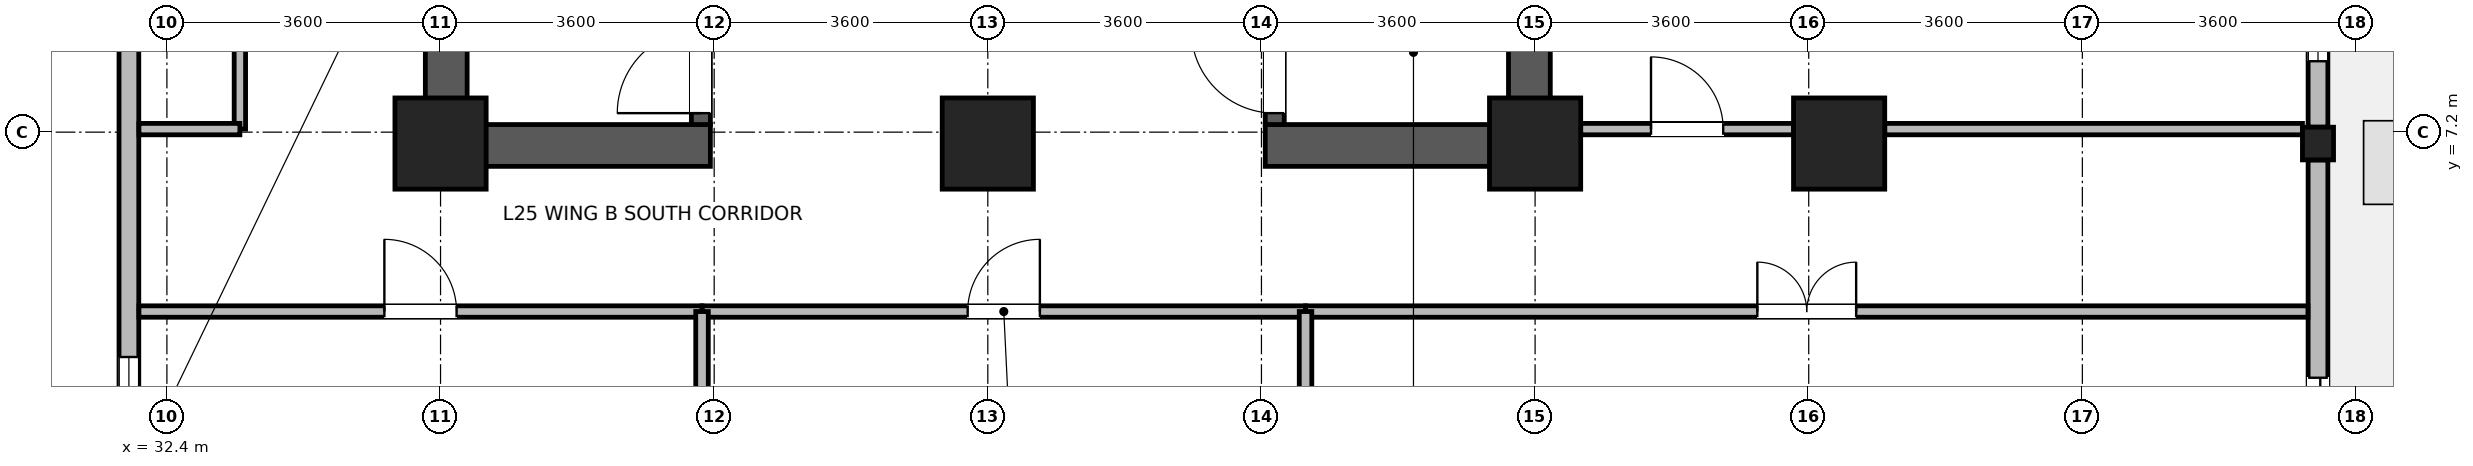
"""IFC4 building model, lengths in metres.
Left out: names, types, materials, properties, quantities, classifications, styles, units other than length and angle.
Written with IfcOpenShell. Run it as: python <this file> out.ifc"""

import sys

from ifc_helpers import new_model, si_unit, direction, frame, frame_2d, origin, origin_2d, place, context, subcontext, project, spatial, rectangle, i_section, extrude, source, transform, mapped, element, fill, save


model = new_model("IFC4")
c1 = context("Model", 3, precision=1e-05, world=origin(), true_north=direction((0.0, 1.0)))
c2 = subcontext(c1, "Body", "Model", "MODEL_VIEW")
j1 = project(units=[si_unit("LENGTHUNIT", "METRE"), si_unit("PLANEANGLEUNIT", "RADIAN")], contexts=[c1])
p1 = place(None, origin())
s1 = spatial("IfcSite", under=j1, at=p1, CompositionType="ELEMENT")
p2 = place(p1, origin())
s2 = spatial("IfcBuilding", under=s1, at=p2, CompositionType="ELEMENT")
p3 = place(p2, frame((0.0, 0.0, 100.8)))
s3 = spatial("IfcBuildingStorey", under=s2, at=p3, CompositionType="ELEMENT", Elevation=100.8)
for number, where, z_axis, x_axis in (
    (1, (36.075, 6.75, 0.0), (0.0, 0.0, 1.0), (0.0, 1.0, 0.0)),
    (2, (50.325, 6.75, 0.0), (0.0, 0.0, 1.0), (0.0, 1.0, 0.0)),
):
    element("IfcWall", number, at=place(p3, frame(where, z_axis=z_axis, x_axis=x_axis)), inside=s3, PredefinedType="SHEAR", context=c2, shape_type="SweptSolid", body=[
        extrude(rectangle(XDim=8.1, YDim=0.55, at=frame_2d((4.05, 0.0))), origin(), (0.0, 0.0, 1.0), 3.45),
    ])
for number, where, z_axis, x_axis in (
    (3, (36.35, 7.025, 0.0), (0.0, 0.0, 1.0), (1.0, 0.0, 0.0)),
    (4, (46.85, 7.025, 0.0), (0.0, 0.0, 1.0), (1.0, 0.0, 0.0)),
):
    element("IfcWall", number, at=place(p3, frame(where, z_axis=z_axis, x_axis=x_axis)), inside=s3, PredefinedType="SHEAR", context=c2, shape_type="SweptSolid", body=[
        extrude(rectangle(XDim=3.2, YDim=0.55, at=frame_2d((1.6, 0.0))), origin(), (0.0, 0.0, 1.0), 3.45),
    ])
p4 = place(p3, frame((39.425, 7.3, 0.0), z_axis=(0.0, 0.0, 1.0), x_axis=(0.0, 1.0, 0.0)))
e5 = element("IfcWall", 5, at=p4, inside=s3, PredefinedType="SHEAR", context=c2, shape_type="SweptSolid", body=[
    extrude(rectangle(XDim=7.0, YDim=0.25, at=frame_2d((3.5, 0.0))), origin(), (0.0, 0.0, 1.0), 3.45),
])
p5 = place(p4, frame((0.15, 0.0, 0.0)))
e6 = element("IfcOpeningElement", 6, at=p5, cuts=e5, PredefinedType="OPENING", context=c2, shape_type="SweptSolid", body=[
    extrude(rectangle(XDim=1.1, YDim=2.08, at=frame_2d((0.55, 1.04))), frame((0.0, 0.135, 0.0), z_axis=(0.0, -1.0, 0.0), x_axis=(1.0, 0.0, 0.0)), (0.0, 0.0, 1.0), 0.27),
])
p6 = place(p3, frame((46.975, 7.3, 0.0), z_axis=(0.0, 0.0, 1.0), x_axis=(0.0, 1.0, 0.0)))
e7 = element("IfcWall", 7, at=p6, inside=s3, PredefinedType="SHEAR", context=c2, shape_type="SweptSolid", body=[
    extrude(rectangle(XDim=7.0, YDim=0.25, at=frame_2d((3.5, 0.0))), origin(), (0.0, 0.0, 1.0), 3.45),
])
p7 = place(p6, frame((0.15, 0.0, 0.0)))
e8 = element("IfcOpeningElement", 8, at=p7, cuts=e7, PredefinedType="OPENING", context=c2, shape_type="SweptSolid", body=[
    extrude(rectangle(XDim=1.1, YDim=2.08, at=frame_2d((0.55, 1.04))), frame((0.0, 0.135, 0.0), z_axis=(0.0, -1.0, 0.0), x_axis=(1.0, 0.0, 0.0)), (0.0, 0.0, 1.0), 0.27),
])
m1 = source(origin(), c2, "Body", "SweptSolid", [
    extrude(rectangle(XDim=1.2, YDim=1.2, at=origin_2d()), origin(), (0.0, 0.0, 1.0), 3.7),
])
for number, where, z_axis, x_axis in (
    (9, (36.0, 7.05, 0.0), (0.0, 0.0, 1.0), (1.0, 0.0, 0.0)),
    (10, (43.2, 7.05, 0.0), (0.0, 0.0, 1.0), (1.0, 0.0, 0.0)),
    (11, (50.4, 7.05, 0.0), (0.0, 0.0, 1.0), (1.0, 0.0, 0.0)),
    (12, (54.4, 7.05, 0.0), (0.0, 0.0, 1.0), (1.0, 0.0, 0.0)),
):
    element("IfcColumn", number, at=place(p3, frame(where, z_axis=z_axis, x_axis=x_axis)), inside=s3, PredefinedType="COLUMN", context=c2, shape_type="MappedRepresentation", body=[
        mapped(m1, transform((0.0, 0.0, 0.0), x_axis=(1.0, 0.0, 0.0), y_axis=(0.0, 1.0, 0.0), z_axis=(0.0, 0.0, 1.0), scale=1.0)),
    ])
m2 = source(origin(), c2, "Body", "SweptSolid", [
    extrude(i_section(OverallWidth=0.409, OverallDepth=0.43, WebThickness=0.024, FlangeThickness=0.033, FilletRadius=0.015, at=origin_2d()), origin(), (0.0, 0.0, 1.0), 3.7),
])
p8 = place(p3, frame((60.7, 7.05, 0.0), z_axis=(0.0, 0.0, 1.0), x_axis=(1.0, 0.0, 0.0)))
e13 = element("IfcColumn", 13, at=p8, inside=s3, PredefinedType="COLUMN", context=c2, shape_type="MappedRepresentation", body=[
    mapped(m2, transform((0.0, 0.0, 0.0), x_axis=(1.0, 0.0, 0.0), y_axis=(0.0, 1.0, 0.0), z_axis=(0.0, 0.0, 1.0), scale=1.0)),
])
p9 = place(p3, frame((60.7, 6.834, 0.0), z_axis=(0.0, 0.0, 1.0), x_axis=(0.0, -1.0, 0.0)))
e14 = element("IfcWall", 14, at=p9, inside=s3, PredefinedType="STANDARD", context=c2, shape_type="SweptSolid", body=[
    extrude(rectangle(XDim=5.164, YDim=0.26, at=frame_2d((2.582, 0.0))), origin(), (0.0, 0.0, 1.0), 3.43),
])
p10 = place(p9, frame((2.865, 0.0, 0.0)))
e15 = element("IfcOpeningElement", 15, at=p10, cuts=e14, PredefinedType="OPENING", context=c2, shape_type="SweptSolid", body=[
    extrude(rectangle(XDim=1.5, YDim=2.15, at=frame_2d((0.75, 1.075))), frame((0.0, 0.14, 0.0), z_axis=(0.0, -1.0, 0.0), x_axis=(1.0, 0.0, 0.0)), (0.0, 0.0, 1.0), 0.28),
])
p11 = place(p3, frame((60.7, 14.334, 0.0), z_axis=(0.0, 0.0, 1.0), x_axis=(0.0, -1.0, 0.0)))
e16 = element("IfcWall", 16, at=p11, inside=s3, PredefinedType="STANDARD", context=c2, shape_type="SweptSolid", body=[
    extrude(rectangle(XDim=7.068, YDim=0.26, at=frame_2d((3.534, 0.0))), origin(), (0.0, 0.0, 1.0), 2.98),
])
p12 = place(p11, frame((0.867, 0.0, 0.85)))
e17 = element("IfcOpeningElement", 17, at=p12, cuts=e16, PredefinedType="OPENING", context=c2, shape_type="SweptSolid", body=[
    extrude(rectangle(XDim=1.8, YDim=1.85, at=frame_2d((0.9, 0.925))), frame((0.0, 0.14, 0.0), z_axis=(0.0, -1.0, 0.0), x_axis=(1.0, 0.0, 0.0)), (0.0, 0.0, 1.0), 0.28),
])
p13 = place(p11, frame((4.401, 0.0, 0.85)))
e18 = element("IfcOpeningElement", 18, at=p13, cuts=e16, PredefinedType="OPENING", context=c2, shape_type="SweptSolid", body=[
    extrude(rectangle(XDim=1.8, YDim=1.85, at=frame_2d((0.9, 0.925))), frame((0.0, 0.14, 0.0), z_axis=(0.0, -1.0, 0.0), x_axis=(1.0, 0.0, 0.0)), (0.0, 0.0, 1.0), 0.28),
])
p14 = place(p3, frame((31.9, 1.67, 0.0), z_axis=(0.0, 0.0, 1.0), x_axis=(0.0, 1.0, 0.0)))
e19 = element("IfcWall", 19, at=p14, inside=s3, PredefinedType="STANDARD", context=c2, shape_type="SweptSolid", body=[
    extrude(rectangle(XDim=20.06, YDim=0.26, at=frame_2d((10.03, 0.0))), origin(), (0.0, 0.0, 1.0), 3.43),
])
p15 = place(p14, frame((0.772, 0.0, 0.85)))
e20 = element("IfcOpeningElement", 20, at=p15, cuts=e19, PredefinedType="OPENING", context=c2, shape_type="SweptSolid", body=[
    extrude(rectangle(XDim=1.8, YDim=1.85, at=frame_2d((0.9, 0.925))), frame((0.0, 0.14, 0.0), z_axis=(0.0, -1.0, 0.0), x_axis=(1.0, 0.0, 0.0)), (0.0, 0.0, 1.0), 0.28),
])
p16 = place(p14, frame((7.458, 0.0, 0.85)))
e21 = element("IfcOpeningElement", 21, at=p16, cuts=e19, PredefinedType="OPENING", context=c2, shape_type="SweptSolid", body=[
    extrude(rectangle(XDim=1.8, YDim=1.85, at=frame_2d((0.9, 0.925))), frame((0.0, 0.14, 0.0), z_axis=(0.0, -1.0, 0.0), x_axis=(1.0, 0.0, 0.0)), (0.0, 0.0, 1.0), 0.28),
])
p17 = place(p14, frame((14.145, 0.0, 0.85)))
e22 = element("IfcOpeningElement", 22, at=p17, cuts=e19, PredefinedType="OPENING", context=c2, shape_type="SweptSolid", body=[
    extrude(rectangle(XDim=1.8, YDim=1.85, at=frame_2d((0.9, 0.925))), frame((0.0, 0.14, 0.0), z_axis=(0.0, -1.0, 0.0), x_axis=(1.0, 0.0, 0.0)), (0.0, 0.0, 1.0), 0.28),
])
p18 = place(p14, frame((17.488, 0.0, 0.85)))
e23 = element("IfcOpeningElement", 23, at=p18, cuts=e19, PredefinedType="OPENING", context=c2, shape_type="SweptSolid", body=[
    extrude(rectangle(XDim=1.8, YDim=1.85, at=frame_2d((0.9, 0.925))), frame((0.0, 0.14, 0.0), z_axis=(0.0, -1.0, 0.0), x_axis=(1.0, 0.0, 0.0)), (0.0, 0.0, 1.0), 0.28),
])
p19 = place(p3, frame((47.38, 4.84, 0.0), z_axis=(0.0, 0.0, 1.0), x_axis=(1.0, 0.0, 0.0)))
e24 = element("IfcWall", 24, at=p19, inside=s3, PredefinedType="PARTITIONING", context=c2, shape_type="SweptSolid", body=[
    extrude(rectangle(XDim=13.188, YDim=0.15, at=frame_2d((6.594, 0.0))), origin(), (0.0, 0.0, 1.0), 3.43),
])
p20 = place(p19, frame((5.944, 0.0, 0.0)))
e25 = element("IfcOpeningElement", 25, at=p20, cuts=e24, PredefinedType="OPENING", context=c2, shape_type="SweptSolid", body=[
    extrude(rectangle(XDim=1.3, YDim=2.12, at=frame_2d((0.65, 1.06))), frame((0.0, 0.085, 0.0), z_axis=(0.0, -1.0, 0.0), x_axis=(1.0, 0.0, 0.0)), (0.0, 0.0, 1.0), 0.17),
])
p21 = place(p3, frame((51.0, 7.24, 0.0), z_axis=(0.0, 0.0, 1.0), x_axis=(1.0, 0.0, 0.0)))
e26 = element("IfcWall", 26, at=p21, inside=s3, PredefinedType="PARTITIONING", context=c2, shape_type="SweptSolid", body=[
    extrude(rectangle(XDim=2.8, YDim=0.15, at=frame_2d((1.4, 0.0))), origin(), (0.0, 0.0, 1.0), 2.78),
])
p22 = place(p21, frame((0.925, 0.0, 0.0)))
e27 = element("IfcOpeningElement", 27, at=p22, cuts=e26, PredefinedType="OPENING", context=c2, shape_type="SweptSolid", body=[
    extrude(rectangle(XDim=0.95, YDim=2.1, at=frame_2d((0.475, 1.05))), frame((0.0, 0.085, 0.0), z_axis=(0.0, -1.0, 0.0), x_axis=(1.0, 0.0, 0.0)), (0.0, 0.0, 1.0), 0.17),
])
p23 = place(p3, frame((55.0, 7.24, 0.0), z_axis=(0.0, 0.0, 1.0), x_axis=(1.0, 0.0, 0.0)))
e28 = element("IfcWall", 28, at=p23, inside=s3, PredefinedType="PARTITIONING", context=c2, shape_type="SweptSolid", body=[
    extrude(rectangle(XDim=5.496, YDim=0.15, at=frame_2d((2.748, 0.0))), origin(), (0.0, 0.0, 1.0), 2.78),
])
p24 = place(p3, frame((39.44, 4.84, 0.0), z_axis=(0.0, 0.0, 1.0), x_axis=(1.0, 0.0, 0.0)))
e29 = element("IfcWall", 29, at=p24, inside=s3, PredefinedType="PARTITIONING", context=c2, shape_type="SweptSolid", body=[
    extrude(rectangle(XDim=7.94, YDim=0.15, at=frame_2d((3.97, 0.0))), origin(), (0.0, 0.0, 1.0), 3.43),
])
p25 = place(p24, frame((3.495, 0.0, 0.0)))
e30 = element("IfcOpeningElement", 30, at=p25, cuts=e29, PredefinedType="OPENING", context=c2, shape_type="SweptSolid", body=[
    extrude(rectangle(XDim=0.95, YDim=2.1, at=frame_2d((0.475, 1.05))), frame((0.0, 0.085, 0.0), z_axis=(0.0, -1.0, 0.0), x_axis=(1.0, 0.0, 0.0)), (0.0, 0.0, 1.0), 0.17),
])
p26 = place(p3, frame((32.032, 4.84, 0.0), z_axis=(0.0, 0.0, 1.0), x_axis=(1.0, 0.0, 0.0)))
e31 = element("IfcWall", 31, at=p26, inside=s3, PredefinedType="PARTITIONING", context=c2, shape_type="SweptSolid", body=[
    extrude(rectangle(XDim=7.408, YDim=0.15, at=frame_2d((3.704, 0.0))), origin(), (0.0, 0.0, 1.0), 3.43),
])
p27 = place(p26, frame((3.229, 0.0, 0.0)))
e32 = element("IfcOpeningElement", 32, at=p27, cuts=e31, PredefinedType="OPENING", context=c2, shape_type="SweptSolid", body=[
    extrude(rectangle(XDim=0.95, YDim=2.1, at=frame_2d((0.475, 1.05))), frame((0.0, 0.085, 0.0), z_axis=(0.0, -1.0, 0.0), x_axis=(1.0, 0.0, 0.0)), (0.0, 0.0, 1.0), 0.17),
])
p28 = place(p3, frame((33.36, 7.24, 0.0), z_axis=(0.0, 0.0, 1.0), x_axis=(0.0, 1.0, 0.0)))
e33 = element("IfcWall", 33, at=p28, inside=s3, PredefinedType="PARTITIONING", context=c2, shape_type="SweptSolid", body=[
    extrude(rectangle(XDim=7.26, YDim=0.15, at=frame_2d((3.63, 0.0))), origin(), (0.0, 0.0, 1.0), 3.43),
])
p29 = place(p28, frame((2.98, 0.0, 0.0)))
e34 = element("IfcOpeningElement", 34, at=p29, cuts=e33, PredefinedType="OPENING", context=c2, shape_type="SweptSolid", body=[
    extrude(rectangle(XDim=1.3, YDim=2.12, at=frame_2d((0.65, 1.06))), frame((0.0, 0.085, 0.0), z_axis=(0.0, -1.0, 0.0), x_axis=(1.0, 0.0, 0.0)), (0.0, 0.0, 1.0), 0.17),
])
p30 = place(p3, frame((32.032, 7.24, 0.0), z_axis=(0.0, 0.0, 1.0), x_axis=(1.0, 0.0, 0.0)))
e35 = element("IfcWall", 35, at=p30, inside=s3, PredefinedType="PARTITIONING", context=c2, shape_type="SweptSolid", body=[
    extrude(rectangle(XDim=1.328, YDim=0.15, at=frame_2d((0.664, 0.0))), origin(), (0.0, 0.0, 1.0), 3.43),
])
for number, where, z_axis, x_axis in (
    (36, (39.44, 1.932, 0.0), (0.0, 0.0, 1.0), (0.0, 1.0, 0.0)),
    (37, (47.38, 1.932, 0.0), (0.0, 0.0, 1.0), (0.0, 1.0, 0.0)),
):
    element("IfcWall", number, at=place(p3, frame(where, z_axis=z_axis, x_axis=x_axis)), inside=s3, PredefinedType="PARTITIONING", context=c2, shape_type="SweptSolid", body=[
        extrude(rectangle(XDim=2.908, YDim=0.165, at=frame_2d((1.454, 0.0))), origin(), (0.0, 0.0, 1.0), 3.43),
    ])
p31 = place(p10, origin())
e38 = element("IfcDoor", 38, at=p31, inside=s3, OperationType="SLIDING_TO_LEFT", PredefinedType="DOOR", context=c2, shape_type="SweptSolid", body=[
    extrude(rectangle(XDim=1.5, YDim=2.15, at=frame_2d((0.75, 1.075))), frame((0.0, 0.025, 0.0), z_axis=(0.0, -1.0, 0.0), x_axis=(1.0, 0.0, 0.0)), (0.0, 0.0, 1.0), 0.05),
])
fill(e15, e38)
p32 = place(p13, origin())
e39 = element("IfcWindow", 39, at=p32, inside=s3, PartitioningType="SINGLE_PANEL", PredefinedType="WINDOW", context=c2, shape_type="SweptSolid", body=[
    extrude(rectangle(XDim=1.8, YDim=1.85, at=frame_2d((0.9, 0.925))), frame((0.0, 0.03, 0.0), z_axis=(0.0, -1.0, 0.0), x_axis=(1.0, 0.0, 0.0)), (0.0, 0.0, 1.0), 0.06),
])
fill(e18, e39)
p33 = place(p15, origin())
e40 = element("IfcWindow", 40, at=p33, inside=s3, PartitioningType="SINGLE_PANEL", PredefinedType="WINDOW", context=c2, shape_type="SweptSolid", body=[
    extrude(rectangle(XDim=1.8, YDim=1.85, at=frame_2d((0.9, 0.925))), frame((0.0, 0.03, 0.0), z_axis=(0.0, -1.0, 0.0), x_axis=(1.0, 0.0, 0.0)), (0.0, 0.0, 1.0), 0.06),
])
fill(e20, e40)
p34 = place(p5, origin())
e41 = element("IfcDoor", 41, at=p34, inside=s3, OperationType="SINGLE_SWING_LEFT", PredefinedType="DOOR", context=c2, shape_type="SweptSolid", body=[
    extrude(rectangle(XDim=1.1, YDim=2.08, at=frame_2d((0.55, 1.04))), frame((0.0, 0.025, 0.0), z_axis=(0.0, -1.0, 0.0), x_axis=(1.0, 0.0, 0.0)), (0.0, 0.0, 1.0), 0.05),
])
fill(e6, e41)
p35 = place(p7, origin())
e42 = element("IfcDoor", 42, at=p35, inside=s3, OperationType="SINGLE_SWING_RIGHT", PredefinedType="DOOR", context=c2, shape_type="SweptSolid", body=[
    extrude(rectangle(XDim=1.1, YDim=2.08, at=frame_2d((0.55, 1.04))), frame((0.0, 0.025, 0.0), z_axis=(0.0, -1.0, 0.0), x_axis=(1.0, 0.0, 0.0)), (0.0, 0.0, 1.0), 0.05),
])
fill(e8, e42)
p36 = place(p20, origin())
e43 = element("IfcDoor", 43, at=p36, inside=s3, OperationType="DOUBLE_DOOR_SINGLE_SWING", PredefinedType="DOOR", context=c2, shape_type="SweptSolid", body=[
    extrude(rectangle(XDim=1.3, YDim=2.12, at=frame_2d((0.65, 1.06))), frame((0.0, 0.025, 0.0), z_axis=(0.0, -1.0, 0.0), x_axis=(1.0, 0.0, 0.0)), (0.0, 0.0, 1.0), 0.05),
])
fill(e25, e43)
p37 = place(p22, origin())
e44 = element("IfcDoor", 44, at=p37, inside=s3, OperationType="SINGLE_SWING_LEFT", PredefinedType="DOOR", context=c2, shape_type="SweptSolid", body=[
    extrude(rectangle(XDim=0.95, YDim=2.1, at=frame_2d((0.475, 1.05))), frame((0.0, 0.025, 0.0), z_axis=(0.0, -1.0, 0.0), x_axis=(1.0, 0.0, 0.0)), (0.0, 0.0, 1.0), 0.05),
])
fill(e27, e44)
p38 = place(p25, origin())
e45 = element("IfcDoor", 45, at=p38, inside=s3, OperationType="SINGLE_SWING_RIGHT", PredefinedType="DOOR", context=c2, shape_type="SweptSolid", body=[
    extrude(rectangle(XDim=0.95, YDim=2.1, at=frame_2d((0.475, 1.05))), frame((0.0, 0.025, 0.0), z_axis=(0.0, -1.0, 0.0), x_axis=(1.0, 0.0, 0.0)), (0.0, 0.0, 1.0), 0.05),
])
fill(e30, e45)
p39 = place(p27, origin())
e46 = element("IfcDoor", 46, at=p39, inside=s3, OperationType="SINGLE_SWING_LEFT", PredefinedType="DOOR", context=c2, shape_type="SweptSolid", body=[
    extrude(rectangle(XDim=0.95, YDim=2.1, at=frame_2d((0.475, 1.05))), frame((0.0, 0.025, 0.0), z_axis=(0.0, -1.0, 0.0), x_axis=(1.0, 0.0, 0.0)), (0.0, 0.0, 1.0), 0.05),
])
fill(e32, e46)
save(model, sys.argv[1])
